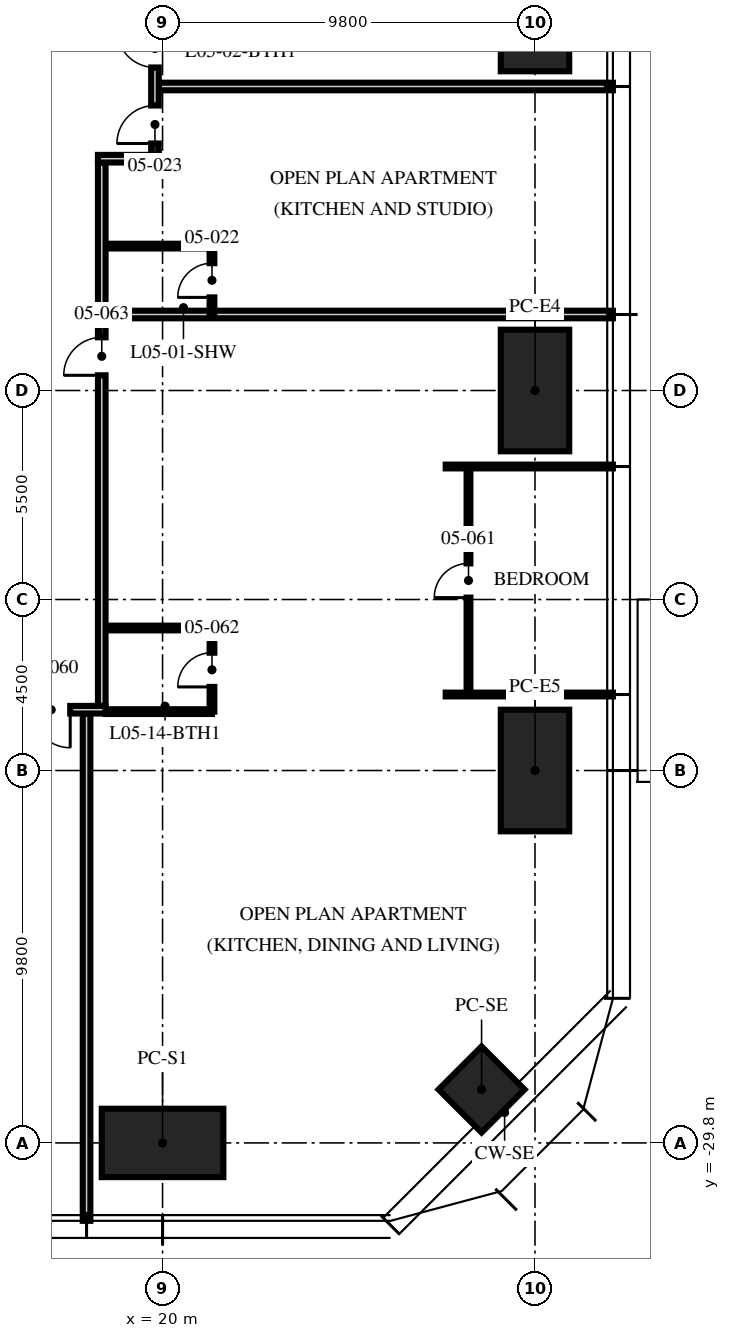
"""IFC4 building model, lengths in metres.
Left out: names, types, materials, properties, quantities, classifications, styles, units other than length and angle.
Written with IfcOpenShell. Run it as: python <this file> out.ifc"""

import sys

from ifc_helpers import new_model, si_unit, direction, frame, frame_2d, origin, origin_2d, place, context, subcontext, project, spatial, rectangle, hollow_rectangle, extrude, element, fill, save


model = new_model("IFC4")
c1 = context("Model", 3, precision=1e-05, world=origin(), true_north=direction((0.0, 1.0)))
c2 = subcontext(c1, "Body", "Model", "MODEL_VIEW")
j1 = project(units=[si_unit("LENGTHUNIT", "METRE"), si_unit("PLANEANGLEUNIT", "RADIAN")], contexts=[c1])
p1 = place(None, origin())
s1 = spatial("IfcSite", under=j1, at=p1, CompositionType="ELEMENT")
p2 = place(p1, origin())
s2 = spatial("IfcBuilding", under=s1, at=p2, CompositionType="ELEMENT")
p3 = place(p2, frame((0.0, 0.0, 24.75)))
s3 = spatial("IfcBuildingStorey", under=s2, at=p3, CompositionType="ELEMENT", Elevation=24.75)
for number, where, z_axis, x_axis in (
    (1, (29.8, 0.0, 0.0), (0.0, 0.0, 1.0), (0.0, 1.0, 0.0)),
    (2, (29.8, -10.0, 0.0), (0.0, 0.0, 1.0), (0.0, 1.0, 0.0)),
    (3, (29.8, -20.0, 0.0), (0.0, 0.0, 1.0), (0.0, 1.0, 0.0)),
    (4, (20.0, -29.8, 0.0), (0.0, 0.0, 1.0), (1.0, 0.0, 0.0)),
):
    element("IfcColumn", number, at=place(p3, frame(where, z_axis=z_axis, x_axis=x_axis)), inside=s3, PredefinedType="COLUMN", context=c2, shape_type="SweptSolid", body=[
        extrude(hollow_rectangle(XDim=3.2, YDim=1.8, WallThickness=0.2, at=origin_2d()), origin(), (0.0, 0.0, 1.0), 3.75),
    ])
p4 = place(p3, frame((28.394, -28.394, 0.0), z_axis=(0.0, 0.0, 1.0), x_axis=(0.707106781187, 0.707106781187, 0.0)))
e5 = element("IfcColumn", 5, at=p4, inside=s3, PredefinedType="COLUMN", context=c2, shape_type="SweptSolid", body=[
    extrude(hollow_rectangle(XDim=1.6, YDim=1.6, WallThickness=0.1, at=origin_2d()), origin(), (0.0, 0.0, 1.0), 3.75),
])
p5 = place(p3, frame((18.5, -8.0, 0.0), z_axis=(0.0, 0.0, 1.0), x_axis=(1.0, 0.0, 0.0)))
e6 = element("IfcWall", 6, at=p5, inside=s3, PredefinedType="PARTITIONING", context=c2, shape_type="SweptSolid", body=[
    extrude(rectangle(XDim=13.35, YDim=0.2, at=frame_2d((6.675, 0.0))), origin(), (0.0, 0.0, 1.0), 2.71),
])
p6 = place(p3, frame((19.9, -2.0, 0.0), z_axis=(0.0, 0.0, 1.0), x_axis=(1.0, 0.0, 0.0)))
e7 = element("IfcWall", 7, at=p6, inside=s3, PredefinedType="PARTITIONING", context=c2, shape_type="SweptSolid", body=[
    extrude(rectangle(XDim=11.95, YDim=0.2, at=frame_2d((5.975, 0.0))), origin(), (0.0, 0.0, 1.0), 2.71),
])
p7 = place(p3, frame((18.0, -18.5, 0.0), z_axis=(0.0, 0.0, 1.0), x_axis=(0.0, -1.0, 0.0)))
e8 = element("IfcWall", 8, at=p7, inside=s3, PredefinedType="PARTITIONING", context=c2, shape_type="SweptSolid", body=[
    extrude(rectangle(XDim=13.35, YDim=0.2, at=frame_2d((6.675, 0.0))), origin(), (0.0, 0.0, 1.0), 2.3),
])
for number, where, z_axis, x_axis in (
    (9, (27.45, -18.0, 0.0), (0.0, 0.0, 1.0), (1.0, 0.0, 0.0)),
    (10, (27.45, -12.0, 0.0), (0.0, 0.0, 1.0), (1.0, 0.0, 0.0)),
):
    element("IfcWall", number, at=place(p3, frame(where, z_axis=z_axis, x_axis=x_axis)), inside=s3, PredefinedType="PARTITIONING", context=c2, shape_type="SweptSolid", body=[
        extrude(rectangle(XDim=4.4, YDim=0.1, at=frame_2d((2.2, 0.0))), origin(), (0.0, 0.0, 1.0), 2.71),
    ])
p8 = place(p3, frame((21.3, -8.0, 0.0), z_axis=(0.0, 0.0, 1.0), x_axis=(0.0, 1.0, 0.0)))
e11 = element("IfcWall", 11, at=p8, inside=s3, PredefinedType="PARTITIONING", context=c2, shape_type="SweptSolid", body=[
    extrude(rectangle(XDim=1.8, YDim=0.125, at=frame_2d((0.9, 0.0))), origin(), (0.0, 0.0, 1.0), 3.5),
])
p9 = place(p8, frame((0.45, 0.0, 0.0)))
e12 = element("IfcOpeningElement", 12, at=p9, cuts=e11, PredefinedType="OPENING", context=c2, shape_type="SweptSolid", body=[
    extrude(rectangle(XDim=0.9, YDim=2.1, at=frame_2d((0.45, 1.05))), frame((0.0, 0.073, 0.0), z_axis=(0.0, -1.0, 0.0), x_axis=(1.0, 0.0, 0.0)), (0.0, 0.0, 1.0), 0.145),
])
p10 = place(p3, frame((18.5, -6.2, 0.0), z_axis=(0.0, 0.0, 1.0), x_axis=(1.0, 0.0, 0.0)))
e13 = element("IfcWall", 13, at=p10, inside=s3, PredefinedType="PARTITIONING", context=c2, shape_type="SweptSolid", body=[
    extrude(rectangle(XDim=2.8, YDim=0.125, at=frame_2d((1.4, 0.0))), origin(), (0.0, 0.0, 1.0), 3.5),
])
p11 = place(p3, frame((28.05, -18.0, 0.0), z_axis=(0.0, 0.0, 1.0), x_axis=(0.0, 1.0, 0.0)))
e14 = element("IfcWall", 14, at=p11, inside=s3, PredefinedType="PARTITIONING", context=c2, shape_type="SweptSolid", body=[
    extrude(rectangle(XDim=6.0, YDim=0.1, at=frame_2d((3.0, 0.0))), origin(), (0.0, 0.0, 1.0), 2.61),
])
p12 = place(p11, frame((2.55, 0.0, 0.0)))
e15 = element("IfcOpeningElement", 15, at=p12, cuts=e14, PredefinedType="OPENING", context=c2, shape_type="SweptSolid", body=[
    extrude(rectangle(XDim=0.9, YDim=2.1, at=frame_2d((0.45, 1.05))), frame((0.0, 0.06, 0.0), z_axis=(0.0, -1.0, 0.0), x_axis=(1.0, 0.0, 0.0)), (0.0, 0.0, 1.0), 0.12),
])
p13 = place(p3, frame((21.3, -18.45, 0.0), z_axis=(0.0, 0.0, 1.0), x_axis=(0.0, 1.0, 0.0)))
e16 = element("IfcWall", 16, at=p13, inside=s3, PredefinedType="PARTITIONING", context=c2, shape_type="SweptSolid", body=[
    extrude(rectangle(XDim=2.2, YDim=0.125, at=frame_2d((1.1, 0.0))), origin(), (0.0, 0.0, 1.0), 3.5),
])
p14 = place(p13, frame((0.65, 0.0, 0.0)))
e17 = element("IfcOpeningElement", 17, at=p14, cuts=e16, PredefinedType="OPENING", context=c2, shape_type="SweptSolid", body=[
    extrude(rectangle(XDim=0.9, YDim=2.1, at=frame_2d((0.45, 1.05))), frame((0.0, 0.073, 0.0), z_axis=(0.0, -1.0, 0.0), x_axis=(1.0, 0.0, 0.0)), (0.0, 0.0, 1.0), 0.145),
])
p15 = place(p3, frame((18.5, -18.45, 0.0), z_axis=(0.0, 0.0, 1.0), x_axis=(1.0, 0.0, 0.0)))
e18 = element("IfcWall", 18, at=p15, inside=s3, PredefinedType="PARTITIONING", context=c2, shape_type="SweptSolid", body=[
    extrude(rectangle(XDim=2.8, YDim=0.125, at=frame_2d((1.4, 0.0))), origin(), (0.0, 0.0, 1.0), 2.3),
])
p16 = place(p3, frame((18.5, -16.25, 0.0), z_axis=(0.0, 0.0, 1.0), x_axis=(1.0, 0.0, 0.0)))
e19 = element("IfcWall", 19, at=p16, inside=s3, PredefinedType="PARTITIONING", context=c2, shape_type="SweptSolid", body=[
    extrude(rectangle(XDim=2.8, YDim=0.125, at=frame_2d((1.4, 0.0))), origin(), (0.0, 0.0, 1.0), 3.5),
])
p17 = place(p3, frame((18.4, -18.3, 0.0), z_axis=(0.0, 0.0, 1.0), x_axis=(0.0, 1.0, 0.0)))
e20 = element("IfcWall", 20, at=p17, inside=s3, PredefinedType="PARTITIONING", context=c2, shape_type="SweptSolid", body=[
    extrude(rectangle(XDim=14.3, YDim=0.2, at=frame_2d((7.15, 0.0))), origin(), (0.0, 0.0, 1.0), 2.3),
])
p18 = place(p17, frame((8.7, 0.0, 0.0)))
e21 = element("IfcOpeningElement", 21, at=p18, cuts=e20, PredefinedType="OPENING", context=c2, shape_type="SweptSolid", body=[
    extrude(rectangle(XDim=1.0, YDim=2.2, at=frame_2d((0.5, 1.1))), frame((0.0, 0.11, 0.0), z_axis=(0.0, -1.0, 0.0), x_axis=(1.0, 0.0, 0.0)), (0.0, 0.0, 1.0), 0.22),
])
p19 = place(p3, frame((18.3, -3.9, 0.0), z_axis=(0.0, 0.0, 1.0), x_axis=(1.0, 0.0, 0.0)))
e22 = element("IfcWall", 22, at=p19, inside=s3, PredefinedType="PARTITIONING", context=c2, shape_type="SweptSolid", body=[
    extrude(rectangle(XDim=1.6, YDim=0.2, at=frame_2d((0.8, 0.0))), origin(), (0.0, 0.0, 1.0), 3.5),
])
p20 = place(p3, frame((19.8, -3.8, 0.0), z_axis=(0.0, 0.0, 1.0), x_axis=(0.0, 1.0, 0.0)))
e23 = element("IfcWall", 23, at=p20, inside=s3, PredefinedType="PARTITIONING", context=c2, shape_type="SweptSolid", body=[
    extrude(rectangle(XDim=3.6, YDim=0.2, at=frame_2d((1.8, 0.0))), origin(), (0.0, 0.0, 1.0), 3.5),
])
p21 = place(p20, frame((0.3, 0.0, 0.0)))
e24 = element("IfcOpeningElement", 24, at=p21, cuts=e23, PredefinedType="OPENING", context=c2, shape_type="SweptSolid", body=[
    extrude(rectangle(XDim=1.0, YDim=2.2, at=frame_2d((0.5, 1.1))), frame((0.0, 0.11, 0.0), z_axis=(0.0, -1.0, 0.0), x_axis=(1.0, 0.0, 0.0)), (0.0, 0.0, 1.0), 0.22),
])
p22 = place(p20, frame((2.3, 0.0, 0.0)))
e25 = element("IfcOpeningElement", 25, at=p22, cuts=e23, PredefinedType="OPENING", context=c2, shape_type="SweptSolid", body=[
    extrude(rectangle(XDim=1.0, YDim=2.2, at=frame_2d((0.5, 1.1))), frame((0.0, 0.11, 0.0), z_axis=(0.0, -1.0, 0.0), x_axis=(1.0, 0.0, 0.0)), (0.0, 0.0, 1.0), 0.22),
])
p23 = place(p3, frame((18.5, -18.4, 0.0), z_axis=(0.0, 0.0, 1.0), x_axis=(-1.0, 0.0, 0.0)))
e26 = element("IfcWall", 26, at=p23, inside=s3, PredefinedType="PARTITIONING", context=c2, shape_type="SweptSolid", body=[
    extrude(rectangle(XDim=37.0, YDim=0.2, at=frame_2d((18.5, 0.0))), origin(), (0.0, 0.0, 1.0), 2.3),
])
p24 = place(p23, frame((17.23, 0.0, 0.0)))
e27 = element("IfcOpeningElement", 27, at=p24, cuts=e26, PredefinedType="OPENING", context=c2, shape_type="SweptSolid", body=[
    extrude(rectangle(XDim=1.0, YDim=2.2, at=frame_2d((0.5, 1.1))), frame((0.0, 0.11, 0.0), z_axis=(0.0, -1.0, 0.0), x_axis=(1.0, 0.0, 0.0)), (0.0, 0.0, 1.0), 0.22),
])
p25 = place(p23, frame((7.23, 0.0, 0.0)))
e28 = element("IfcOpeningElement", 28, at=p25, cuts=e26, PredefinedType="OPENING", context=c2, shape_type="SweptSolid", body=[
    extrude(rectangle(XDim=1.0, YDim=2.2, at=frame_2d((0.5, 1.1))), frame((0.0, 0.11, 0.0), z_axis=(0.0, -1.0, 0.0), x_axis=(1.0, 0.0, 0.0)), (0.0, 0.0, 1.0), 0.22),
])
p26 = place(p23, frame((0.93, 0.0, 0.0)))
e29 = element("IfcOpeningElement", 29, at=p26, cuts=e26, PredefinedType="OPENING", context=c2, shape_type="SweptSolid", body=[
    extrude(rectangle(XDim=1.0, YDim=2.2, at=frame_2d((0.5, 1.1))), frame((0.0, 0.11, 0.0), z_axis=(0.0, -1.0, 0.0), x_axis=(1.0, 0.0, 0.0)), (0.0, 0.0, 1.0), 0.22),
])
p27 = place(p9, origin())
e30 = element("IfcDoor", 30, at=p27, inside=s3, OperationType="SINGLE_SWING_LEFT", PredefinedType="DOOR", context=c2, shape_type="SweptSolid", body=[
    extrude(rectangle(XDim=0.9, YDim=2.1, at=frame_2d((0.45, 1.05))), frame((0.0, 0.025, 0.0), z_axis=(0.0, -1.0, 0.0), x_axis=(1.0, 0.0, 0.0)), (0.0, 0.0, 1.0), 0.05),
])
fill(e12, e30)
p28 = place(p21, origin())
e31 = element("IfcDoor", 31, at=p28, inside=s3, OperationType="SINGLE_SWING_LEFT", PredefinedType="DOOR", context=c2, shape_type="SweptSolid", body=[
    extrude(rectangle(XDim=1.0, YDim=2.2, at=frame_2d((0.5, 1.1))), frame((0.0, 0.025, 0.0), z_axis=(0.0, -1.0, 0.0), x_axis=(1.0, 0.0, 0.0)), (0.0, 0.0, 1.0), 0.05),
])
fill(e24, e31)
p29 = place(p22, origin())
e32 = element("IfcDoor", 32, at=p29, inside=s3, OperationType="SINGLE_SWING_RIGHT", PredefinedType="DOOR", context=c2, shape_type="SweptSolid", body=[
    extrude(rectangle(XDim=1.0, YDim=2.2, at=frame_2d((0.5, 1.1))), frame((0.0, 0.025, 0.0), z_axis=(0.0, -1.0, 0.0), x_axis=(1.0, 0.0, 0.0)), (0.0, 0.0, 1.0), 0.05),
])
fill(e25, e32)
p30 = place(p26, origin())
e33 = element("IfcDoor", 33, at=p30, inside=s3, OperationType="SINGLE_SWING_LEFT", PredefinedType="DOOR", context=c2, shape_type="SweptSolid", body=[
    extrude(rectangle(XDim=1.0, YDim=2.2, at=frame_2d((0.5, 1.1))), frame((0.0, 0.025, 0.0), z_axis=(0.0, -1.0, 0.0), x_axis=(1.0, 0.0, 0.0)), (0.0, 0.0, 1.0), 0.05),
])
fill(e29, e33)
p31 = place(p12, origin())
e34 = element("IfcDoor", 34, at=p31, inside=s3, OperationType="SINGLE_SWING_LEFT", PredefinedType="DOOR", context=c2, shape_type="SweptSolid", body=[
    extrude(rectangle(XDim=0.9, YDim=2.1, at=frame_2d((0.45, 1.05))), frame((0.0, 0.025, 0.0), z_axis=(0.0, -1.0, 0.0), x_axis=(1.0, 0.0, 0.0)), (0.0, 0.0, 1.0), 0.05),
])
fill(e15, e34)
p32 = place(p14, origin())
e35 = element("IfcDoor", 35, at=p32, inside=s3, OperationType="SINGLE_SWING_LEFT", PredefinedType="DOOR", context=c2, shape_type="SweptSolid", body=[
    extrude(rectangle(XDim=0.9, YDim=2.1, at=frame_2d((0.45, 1.05))), frame((0.0, 0.025, 0.0), z_axis=(0.0, -1.0, 0.0), x_axis=(1.0, 0.0, 0.0)), (0.0, 0.0, 1.0), 0.05),
])
fill(e17, e35)
p33 = place(p18, origin())
e36 = element("IfcDoor", 36, at=p33, inside=s3, OperationType="SINGLE_SWING_LEFT", PredefinedType="DOOR", context=c2, shape_type="SweptSolid", body=[
    extrude(rectangle(XDim=1.0, YDim=2.2, at=frame_2d((0.5, 1.1))), frame((0.0, 0.025, 0.0), z_axis=(0.0, -1.0, 0.0), x_axis=(1.0, 0.0, 0.0)), (0.0, 0.0, 1.0), 0.05),
])
fill(e21, e36)
save(model, sys.argv[1])
